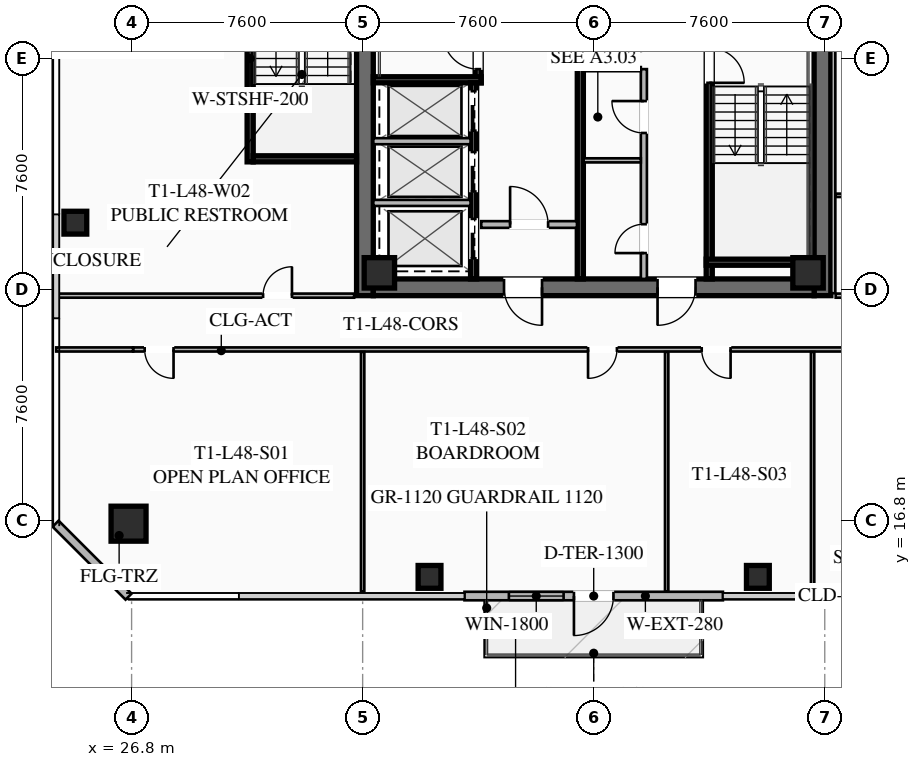
"""IFC4 building model, lengths in metres.
Left out: names, types, materials, properties, quantities, classifications, styles, units other than length and angle.
Written with IfcOpenShell. Run it as: python <this file> out.ifc"""

import sys

from ifc_helpers import new_model, si_unit, direction, frame, frame_2d, origin, origin_2d, place, context, subcontext, project, spatial, rectangle, hollow_rectangle, extrude, element, fill, save


model = new_model("IFC4")
c1 = context("Model", 3, precision=1e-05, world=origin(), true_north=direction((0.0, 1.0)))
c2 = subcontext(c1, "Body", "Model", "MODEL_VIEW")
j1 = project(units=[si_unit("LENGTHUNIT", "METRE"), si_unit("PLANEANGLEUNIT", "RADIAN")], contexts=[c1])
p1 = place(None, origin())
s1 = spatial("IfcSite", under=j1, at=p1, CompositionType="ELEMENT")
p2 = place(p1, origin())
s2 = spatial("IfcBuilding", under=s1, at=p2, CompositionType="ELEMENT")
p3 = place(p2, frame((0.0, 0.0, 178.3)))
s3 = spatial("IfcBuildingStorey", under=s2, at=p3, CompositionType="ELEMENT", Elevation=178.3)
for number, where, z_axis, x_axis in (
    (1, (34.475, 24.2, 0.0), (0.0, 0.0, 1.0), (0.0, 1.0, 0.0)),
    (2, (49.525, 39.8, 0.0), (0.0, 0.0, 1.0), (0.0, -1.0, 0.0)),
):
    element("IfcWall", number, at=place(p3, frame(where, z_axis=z_axis, x_axis=x_axis)), inside=s3, PredefinedType="SHEAR", context=c2, shape_type="SweptSolid", body=[
        extrude(rectangle(XDim=15.6, YDim=0.55, at=frame_2d((7.8, 0.0))), origin(), (0.0, 0.0, 1.0), 3.55),
    ])
p4 = place(p3, frame((49.25, 24.475, 0.0), z_axis=(0.0, 0.0, 1.0), x_axis=(-1.0, 0.0, 0.0)))
e3 = element("IfcWall", 3, at=p4, inside=s3, PredefinedType="SHEAR", context=c2, shape_type="SweptSolid", body=[
    extrude(rectangle(XDim=14.5, YDim=0.55, at=frame_2d((7.25, 0.0))), origin(), (0.0, 0.0, 1.0), 3.55),
])
p5 = place(p4, frame((8.95, 0.0, 0.0)))
e4 = element("IfcOpeningElement", 4, at=p5, cuts=e3, PredefinedType="OPENING", context=c2, shape_type="SweptSolid", body=[
    extrude(rectangle(XDim=1.25, YDim=2.25, at=frame_2d((0.625, 1.125))), frame((0.0, 0.285, 0.0), z_axis=(0.0, -1.0, 0.0), x_axis=(1.0, 0.0, 0.0)), (0.0, 0.0, 1.0), 0.57),
])
p6 = place(p4, frame((3.9, 0.0, 0.0)))
e5 = element("IfcOpeningElement", 5, at=p6, cuts=e3, PredefinedType="OPENING", context=c2, shape_type="SweptSolid", body=[
    extrude(rectangle(XDim=1.25, YDim=2.25, at=frame_2d((0.625, 1.125))), frame((0.0, 0.285, 0.0), z_axis=(0.0, -1.0, 0.0), x_axis=(1.0, 0.0, 0.0)), (0.0, 0.0, 1.0), 0.57),
])
for number, where, z_axis, x_axis in (
    (6, (34.95, 24.95, 0.0), (0.0, 0.0, 1.0), (1.0, 0.0, 0.0)),
    (7, (49.05, 24.95, 0.0), (0.0, 0.0, 1.0), (1.0, 0.0, 0.0)),
):
    element("IfcColumn", number, at=place(p3, frame(where, z_axis=z_axis, x_axis=x_axis)), inside=s3, PredefinedType="COLUMN", context=c2, shape_type="SweptSolid", body=[
        extrude(hollow_rectangle(XDim=1.0, YDim=1.0, WallThickness=0.04, at=origin_2d()), origin(), (0.0, 0.0, 1.0), 3.37),
    ])
p7 = place(p3, frame((26.7, 16.7, 0.0), z_axis=(0.0, 0.0, 1.0), x_axis=(1.0, 0.0, 0.0)))
e8 = element("IfcColumn", 8, at=p7, inside=s3, PredefinedType="COLUMN", context=c2, shape_type="SweptSolid", body=[
    extrude(hollow_rectangle(XDim=1.15, YDim=1.15, WallThickness=0.045, at=origin_2d()), origin(), (0.0, 0.0, 1.0), 3.37),
])
for number, where, z_axis, x_axis in (
    (9, (36.6, 14.95, 0.0), (0.0, 0.0, 1.0), (1.0, 0.0, 0.0)),
    (10, (47.4, 14.95, 0.0), (0.0, 0.0, 1.0), (1.0, 0.0, 0.0)),
    (11, (24.95, 26.6, 0.0), (0.0, 0.0, 1.0), (1.0, 0.0, 0.0)),
):
    element("IfcColumn", number, at=place(p3, frame(where, z_axis=z_axis, x_axis=x_axis)), inside=s3, PredefinedType="COLUMN", context=c2, shape_type="SweptSolid", body=[
        extrude(hollow_rectangle(XDim=0.75, YDim=0.75, WallThickness=0.032, at=origin_2d()), origin(), (0.0, 0.0, 1.0), 3.37),
    ])
p8 = place(p3, frame((46.25, 14.32, 0.0), z_axis=(0.0, 0.0, 1.0), x_axis=(-1.0, 0.0, 0.0)))
e12 = element("IfcWall", 12, at=p8, inside=s3, PredefinedType="SOLIDWALL", context=c2, shape_type="SweptSolid", body=[
    extrude(rectangle(XDim=8.5, YDim=0.28, at=frame_2d((4.25, 0.0))), origin(), (0.0, 0.0, 1.0), 3.37),
])
p9 = place(p8, frame((3.6, 0.0, 0.0)))
e13 = element("IfcOpeningElement", 13, at=p9, cuts=e12, PredefinedType="OPENING", context=c2, shape_type="SweptSolid", body=[
    extrude(rectangle(XDim=1.3, YDim=2.15, at=frame_2d((0.65, 1.075))), frame((0.0, 0.15, 0.0), z_axis=(0.0, -1.0, 0.0), x_axis=(1.0, 0.0, 0.0)), (0.0, 0.0, 1.0), 0.3),
])
p10 = place(p8, frame((5.24, 0.0, 0.85)))
e14 = element("IfcOpeningElement", 14, at=p10, cuts=e12, PredefinedType="OPENING", context=c2, shape_type="SweptSolid", body=[
    extrude(rectangle(XDim=1.8, YDim=1.92, at=frame_2d((0.9, 0.96))), frame((0.0, 0.15, 0.0), z_axis=(0.0, -1.0, 0.0), x_axis=(1.0, 0.0, 0.0)), (0.0, 0.0, 1.0), 0.3),
])
p11 = place(p3, frame((26.7, 14.3, 0.0), z_axis=(0.0, 0.0, 1.0), x_axis=(-0.707106781187, 0.707106781187, 0.0)))
e15 = element("IfcWall", 15, at=p11, inside=s3, PredefinedType="SOLIDWALL", context=c2, shape_type="SweptSolid", body=[
    extrude(rectangle(XDim=3.394, YDim=0.28, at=frame_2d((1.697, 0.0))), origin(), (0.0, 0.0, 1.0), 3.37),
])
p12 = place(p3, frame((38.2, 31.2, 0.0), z_axis=(0.0, 0.0, 1.0), x_axis=(0.0, 1.0, 0.0)))
e16 = element("IfcWall", 16, at=p12, inside=s3, PredefinedType="SHEAR", context=c2, shape_type="SweptSolid", body=[
    extrude(rectangle(XDim=8.05, YDim=0.2, at=frame_2d((4.025, 0.0))), origin(), (0.0, 0.0, 1.0), 3.37),
])
p13 = place(p12, frame((0.45, 0.0, 0.0)))
e17 = element("IfcOpeningElement", 17, at=p13, cuts=e16, PredefinedType="OPENING", context=c2, shape_type="SweptSolid", body=[
    extrude(rectangle(XDim=1.15, YDim=2.2, at=frame_2d((0.575, 1.1))), frame((0.0, 0.11, 0.0), z_axis=(0.0, -1.0, 0.0), x_axis=(1.0, 0.0, 0.0)), (0.0, 0.0, 1.0), 0.22),
])
p14 = place(p3, frame((34.75, 31.3, 0.0), z_axis=(0.0, 0.0, 1.0), x_axis=(1.0, 0.0, 0.0)))
e18 = element("IfcWall", 18, at=p14, inside=s3, PredefinedType="SHEAR", context=c2, shape_type="SweptSolid", body=[
    extrude(rectangle(XDim=3.55, YDim=0.2, at=frame_2d((1.775, 0.0))), origin(), (0.0, 0.0, 1.0), 3.37),
])
p15 = place(p3, frame((45.8, 32.8, 0.0), z_axis=(0.0, 0.0, 1.0), x_axis=(0.0, -1.0, 0.0)))
e19 = element("IfcWall", 19, at=p15, inside=s3, PredefinedType="SHEAR", context=c2, shape_type="SweptSolid", body=[
    extrude(rectangle(XDim=8.05, YDim=0.2, at=frame_2d((4.025, 0.0))), origin(), (0.0, 0.0, 1.0), 3.37),
])
p16 = place(p15, frame((0.45, 0.0, 0.0)))
e20 = element("IfcOpeningElement", 20, at=p16, cuts=e19, PredefinedType="OPENING", context=c2, shape_type="SweptSolid", body=[
    extrude(rectangle(XDim=1.15, YDim=2.2, at=frame_2d((0.575, 1.1))), frame((0.0, 0.11, 0.0), z_axis=(0.0, -1.0, 0.0), x_axis=(1.0, 0.0, 0.0)), (0.0, 0.0, 1.0), 0.22),
])
p17 = place(p3, frame((45.7, 25.3, 0.0), z_axis=(0.0, 0.0, 1.0), x_axis=(1.0, 0.0, 0.0)))
e21 = element("IfcWall", 21, at=p17, inside=s3, PredefinedType="SHEAR", context=c2, shape_type="SweptSolid", body=[
    extrude(rectangle(XDim=3.55, YDim=0.2, at=frame_2d((1.775, 0.0))), origin(), (0.0, 0.0, 1.0), 3.37),
])
p18 = place(p3, frame((41.56, 24.75, 0.0), z_axis=(0.0, 0.0, 1.0), x_axis=(0.0, 1.0, 0.0)))
e22 = element("IfcWall", 22, at=p18, inside=s3, PredefinedType="SHEAR", context=c2, shape_type="SweptSolid", body=[
    extrude(rectangle(XDim=14.5, YDim=0.2, at=frame_2d((7.25, 0.0))), origin(), (0.0, 0.0, 1.0), 3.37),
])
p19 = place(p3, frame((38.3, 26.54, 0.0), z_axis=(0.0, 0.0, 1.0), x_axis=(1.0, 0.0, 0.0)))
e23 = element("IfcWall", 23, at=p19, inside=s3, PredefinedType="SOLIDWALL", context=c2, shape_type="SweptSolid", body=[
    extrude(rectangle(XDim=3.15, YDim=0.22, at=frame_2d((1.575, 0.0))), origin(), (0.0, 0.0, 1.0), 2.723),
])
p20 = place(p19, frame((0.95, 0.0, 0.0)))
e24 = element("IfcOpeningElement", 24, at=p20, cuts=e23, PredefinedType="OPENING", context=c2, shape_type="SweptSolid", body=[
    extrude(rectangle(XDim=1.25, YDim=2.25, at=frame_2d((0.625, 1.125))), frame((0.0, 0.12, 0.0), z_axis=(0.0, -1.0, 0.0), x_axis=(1.0, 0.0, 0.0)), (0.0, 0.0, 1.0), 0.24),
])
p21 = place(p3, frame((38.05, 24.75, 0.0), z_axis=(0.0, 0.0, 1.0), x_axis=(0.0, 1.0, 0.0)))
e25 = element("IfcWall", 25, at=p21, inside=s3, PredefinedType="SHEAR", context=c2, shape_type="SweptSolid", body=[
    extrude(rectangle(XDim=6.45, YDim=0.2, at=frame_2d((3.225, 0.0))), origin(), (0.0, 0.0, 1.0), 3.37),
])
p22 = place(p21, frame((4.875, 0.0, 0.0)))
e26 = element("IfcOpeningElement", 26, at=p22, cuts=e25, PredefinedType="OPENING", context=c2, shape_type="SweptSolid", body=[
    extrude(rectangle(XDim=1.3, YDim=2.25, at=frame_2d((0.65, 1.125))), frame((0.0, 0.11, 0.0), z_axis=(0.0, -1.0, 0.0), x_axis=(1.0, 0.0, 0.0)), (0.0, 0.0, 1.0), 0.22),
])
p23 = place(p21, frame((2.875, 0.0, 0.0)))
e27 = element("IfcOpeningElement", 27, at=p23, cuts=e25, PredefinedType="OPENING", context=c2, shape_type="SweptSolid", body=[
    extrude(rectangle(XDim=1.3, YDim=2.25, at=frame_2d((0.65, 1.125))), frame((0.0, 0.11, 0.0), z_axis=(0.0, -1.0, 0.0), x_axis=(1.0, 0.0, 0.0)), (0.0, 0.0, 1.0), 0.22),
])
p24 = place(p21, frame((0.675, 0.0, 0.0)))
e28 = element("IfcOpeningElement", 28, at=p24, cuts=e25, PredefinedType="OPENING", context=c2, shape_type="SweptSolid", body=[
    extrude(rectangle(XDim=1.3, YDim=2.25, at=frame_2d((0.65, 1.125))), frame((0.0, 0.11, 0.0), z_axis=(0.0, -1.0, 0.0), x_axis=(1.0, 0.0, 0.0)), (0.0, 0.0, 1.0), 0.22),
])
for number, where, z_axis, x_axis in (
    (29, (34.75, 27.25, 0.0), (0.0, 0.0, 1.0), (1.0, 0.0, 0.0)),
    (30, (34.75, 29.28, 0.0), (0.0, 0.0, 1.0), (1.0, 0.0, 0.0)),
):
    element("IfcWall", number, at=place(p3, frame(where, z_axis=z_axis, x_axis=x_axis)), inside=s3, PredefinedType="SOLIDWALL", context=c2, shape_type="SweptSolid", body=[
        extrude(rectangle(XDim=3.2, YDim=0.2, at=frame_2d((1.6, 0.0))), origin(), (0.0, 0.0, 1.0), 3.37),
    ])
p25 = place(p3, frame((43.65, 24.75, 0.0), z_axis=(0.0, 0.0, 1.0), x_axis=(0.0, 1.0, 0.0)))
e31 = element("IfcWall", 31, at=p25, inside=s3, PredefinedType="SOLIDWALL", context=c2, shape_type="SweptSolid", body=[
    extrude(rectangle(XDim=6.9, YDim=0.2, at=frame_2d((3.45, 0.0))), origin(), (0.0, 0.0, 1.0), 2.723),
])
p26 = place(p25, frame((0.85, 0.0, 0.0)))
e32 = element("IfcOpeningElement", 32, at=p26, cuts=e31, PredefinedType="OPENING", context=c2, shape_type="SweptSolid", body=[
    extrude(rectangle(XDim=0.95, YDim=2.05, at=frame_2d((0.475, 1.025))), frame((0.0, 0.11, 0.0), z_axis=(0.0, -1.0, 0.0), x_axis=(1.0, 0.0, 0.0)), (0.0, 0.0, 1.0), 0.22),
])
p27 = place(p25, frame((4.8, 0.0, 0.0)))
e33 = element("IfcOpeningElement", 33, at=p27, cuts=e31, PredefinedType="OPENING", context=c2, shape_type="SweptSolid", body=[
    extrude(rectangle(XDim=1.05, YDim=2.2, at=frame_2d((0.525, 1.1))), frame((0.0, 0.11, 0.0), z_axis=(0.0, -1.0, 0.0), x_axis=(1.0, 0.0, 0.0)), (0.0, 0.0, 1.0), 0.22),
])
for number, where, z_axis, x_axis in (
    (34, (41.67, 31.65, 0.0), (0.0, 0.0, 1.0), (1.0, 0.0, 0.0)),
    (35, (41.67, 28.65, 0.0), (0.0, 0.0, 1.0), (1.0, 0.0, 0.0)),
):
    element("IfcWall", number, at=place(p3, frame(where, z_axis=z_axis, x_axis=x_axis)), inside=s3, PredefinedType="PARTITIONING", context=c2, shape_type="SweptSolid", body=[
        extrude(rectangle(XDim=1.88, YDim=0.135, at=frame_2d((0.94, 0.0))), origin(), (0.0, 0.0, 1.0), 2.723),
    ])
p28 = place(p3, frame((30.7, 28.6, 0.0), z_axis=(0.0, 0.0, 1.0), x_axis=(0.0, 1.0, 0.0)))
e36 = element("IfcWall", 36, at=p28, inside=s3, PredefinedType="SHEAR", context=c2, shape_type="SweptSolid", body=[
    extrude(rectangle(XDim=6.8, YDim=0.2, at=frame_2d((3.4, 0.0))), origin(), (0.0, 0.0, 1.0), 3.37),
])
p29 = place(p3, frame((30.8, 28.7, 0.0), z_axis=(0.0, 0.0, 1.0), x_axis=(1.0, 0.0, 0.0)))
e37 = element("IfcWall", 37, at=p29, inside=s3, PredefinedType="SHEAR", context=c2, shape_type="SweptSolid", body=[
    extrude(rectangle(XDim=3.4, YDim=0.2, at=frame_2d((1.7, 0.0))), origin(), (0.0, 0.0, 1.0), 3.37),
])
p30 = place(p3, frame((57.15, 22.43, 0.0), z_axis=(0.0, 0.0, 1.0), x_axis=(-1.0, 0.0, 0.0)))
e38 = element("IfcWall", 38, at=p30, inside=s3, PredefinedType="PARTITIONING", context=c2, shape_type="SweptSolid", body=[
    extrude(rectangle(XDim=30.3, YDim=0.135, at=frame_2d((15.15, 0.0))), origin(), (0.0, 0.0, 1.0), 2.723),
])
p31 = place(p30, frame((28.97, 0.0, 0.0)))
e39 = element("IfcOpeningElement", 39, at=p31, cuts=e38, PredefinedType="OPENING", context=c2, shape_type="SweptSolid", body=[
    extrude(rectangle(XDim=0.95, YDim=2.05, at=frame_2d((0.475, 1.025))), frame((0.0, 0.077, 0.0), z_axis=(0.0, -1.0, 0.0), x_axis=(1.0, 0.0, 0.0)), (0.0, 0.0, 1.0), 0.155),
])
p32 = place(p30, frame((14.386, 0.0, 0.0)))
e40 = element("IfcOpeningElement", 40, at=p32, cuts=e38, PredefinedType="OPENING", context=c2, shape_type="SweptSolid", body=[
    extrude(rectangle(XDim=0.95, YDim=2.05, at=frame_2d((0.475, 1.025))), frame((0.0, 0.077, 0.0), z_axis=(0.0, -1.0, 0.0), x_axis=(1.0, 0.0, 0.0)), (0.0, 0.0, 1.0), 0.155),
])
p33 = place(p30, frame((10.647, 0.0, 0.0)))
e41 = element("IfcOpeningElement", 41, at=p33, cuts=e38, PredefinedType="OPENING", context=c2, shape_type="SweptSolid", body=[
    extrude(rectangle(XDim=0.95, YDim=2.05, at=frame_2d((0.475, 1.025))), frame((0.0, 0.077, 0.0), z_axis=(0.0, -1.0, 0.0), x_axis=(1.0, 0.0, 0.0)), (0.0, 0.0, 1.0), 0.155),
])
p34 = place(p30, frame((0.38, 0.0, 0.0)))
e42 = element("IfcOpeningElement", 42, at=p34, cuts=e38, PredefinedType="OPENING", context=c2, shape_type="SweptSolid", body=[
    extrude(rectangle(XDim=0.95, YDim=2.05, at=frame_2d((0.475, 1.025))), frame((0.0, 0.077, 0.0), z_axis=(0.0, -1.0, 0.0), x_axis=(1.0, 0.0, 0.0)), (0.0, 0.0, 1.0), 0.155),
])
p35 = place(p3, frame((24.32, 22.43, 0.0), z_axis=(0.0, 0.0, 1.0), x_axis=(1.0, 0.0, 0.0)))
e43 = element("IfcWall", 43, at=p35, inside=s3, PredefinedType="PARTITIONING", context=c2, shape_type="SweptSolid", body=[
    extrude(rectangle(XDim=2.53, YDim=0.135, at=frame_2d((1.265, 0.0))), origin(), (0.0, 0.0, 1.0), 2.723),
])
for number, where, z_axis, x_axis in (
    (44, (34.4, 14.47, 0.0), (0.0, 0.0, 1.0), (0.0, 1.0, 0.0)),
    (45, (44.4, 14.47, 0.0), (0.0, 0.0, 1.0), (0.0, 1.0, 0.0)),
    (46, (49.2, 14.47, 0.0), (0.0, 0.0, 1.0), (0.0, 1.0, 0.0)),
):
    element("IfcWall", number, at=place(p3, frame(where, z_axis=z_axis, x_axis=x_axis)), inside=s3, PredefinedType="PARTITIONING", context=c2, shape_type="SweptSolid", body=[
        extrude(rectangle(XDim=7.88, YDim=0.11, at=frame_2d((3.94, 0.0))), origin(), (0.0, 0.0, 1.0), 2.723),
    ])
p36 = place(p3, frame((49.88, 39.72, 0.0), z_axis=(0.0, 0.0, 1.0), x_axis=(0.0, -1.0, 0.0)))
e47 = element("IfcWall", 47, at=p36, inside=s3, PredefinedType="PARTITIONING", context=c2, shape_type="SweptSolid", body=[
    extrude(rectangle(XDim=15.44, YDim=0.135, at=frame_2d((7.72, 0.0))), origin(), (0.0, 0.0, 1.0), 2.723),
])
p37 = place(p3, frame((49.96, 24.2, 0.0), z_axis=(0.0, 0.0, 1.0), x_axis=(1.0, 0.0, 0.0)))
e48 = element("IfcWall", 48, at=p37, inside=s3, PredefinedType="PARTITIONING", context=c2, shape_type="SweptSolid", body=[
    extrude(rectangle(XDim=9.72, YDim=0.135, at=frame_2d((4.86, 0.0))), origin(), (0.0, 0.0, 1.0), 2.723),
])
p38 = place(p37, frame((0.5, 0.0, 0.0)))
e49 = element("IfcOpeningElement", 49, at=p38, cuts=e48, PredefinedType="OPENING", context=c2, shape_type="SweptSolid", body=[
    extrude(rectangle(XDim=0.95, YDim=2.05, at=frame_2d((0.475, 1.025))), frame((0.0, 0.077, 0.0), z_axis=(0.0, -1.0, 0.0), x_axis=(1.0, 0.0, 0.0)), (0.0, 0.0, 1.0), 0.155),
])
p39 = place(p3, frame((49.96, 27.5, 0.0), z_axis=(0.0, 0.0, 1.0), x_axis=(1.0, 0.0, 0.0)))
e50 = element("IfcWall", 50, at=p39, inside=s3, PredefinedType="PARTITIONING", context=c2, shape_type="SweptSolid", body=[
    extrude(rectangle(XDim=9.72, YDim=0.11, at=frame_2d((4.86, 0.0))), origin(), (0.0, 0.0, 1.0), 2.723),
])
p40 = place(p3, frame((24.32, 24.2, 0.0), z_axis=(0.0, 0.0, 1.0), x_axis=(1.0, 0.0, 0.0)))
e51 = element("IfcWall", 51, at=p40, inside=s3, PredefinedType="PARTITIONING", context=c2, shape_type="SweptSolid", body=[
    extrude(rectangle(XDim=9.8, YDim=0.135, at=frame_2d((4.9, 0.0))), origin(), (0.0, 0.0, 1.0), 2.723),
])
p41 = place(p40, frame((6.805, 0.0, 0.0)))
e52 = element("IfcOpeningElement", 52, at=p41, cuts=e51, PredefinedType="OPENING", context=c2, shape_type="SweptSolid", body=[
    extrude(rectangle(XDim=0.95, YDim=2.05, at=frame_2d((0.475, 1.025))), frame((0.0, 0.077, 0.0), z_axis=(0.0, -1.0, 0.0), x_axis=(1.0, 0.0, 0.0)), (0.0, 0.0, 1.0), 0.155),
])
p42 = place(p9, origin())
e53 = element("IfcDoor", 53, at=p42, inside=s3, OperationType="SINGLE_SWING_RIGHT", PredefinedType="DOOR", context=c2, shape_type="SweptSolid", body=[
    extrude(rectangle(XDim=1.3, YDim=2.15, at=frame_2d((0.65, 1.075))), frame((0.0, 0.025, 0.0), z_axis=(0.0, -1.0, 0.0), x_axis=(1.0, 0.0, 0.0)), (0.0, 0.0, 1.0), 0.05),
])
fill(e13, e53)
p43 = place(p10, origin())
e54 = element("IfcWindow", 54, at=p43, inside=s3, PartitioningType="SINGLE_PANEL", PredefinedType="WINDOW", context=c2, shape_type="SweptSolid", body=[
    extrude(rectangle(XDim=1.8, YDim=1.92, at=frame_2d((0.9, 0.96))), frame((0.0, 0.03, 0.0), z_axis=(0.0, -1.0, 0.0), x_axis=(1.0, 0.0, 0.0)), (0.0, 0.0, 1.0), 0.06),
])
fill(e14, e54)
p44 = place(p5, origin())
e55 = element("IfcDoor", 55, at=p44, inside=s3, OperationType="SINGLE_SWING_LEFT", PredefinedType="DOOR", context=c2, shape_type="SweptSolid", body=[
    extrude(rectangle(XDim=1.25, YDim=2.25, at=frame_2d((0.625, 1.125))), frame((0.0, 0.025, 0.0), z_axis=(0.0, -1.0, 0.0), x_axis=(1.0, 0.0, 0.0)), (0.0, 0.0, 1.0), 0.05),
])
fill(e4, e55)
p45 = place(p6, origin())
e56 = element("IfcDoor", 56, at=p45, inside=s3, OperationType="SINGLE_SWING_RIGHT", PredefinedType="DOOR", context=c2, shape_type="SweptSolid", body=[
    extrude(rectangle(XDim=1.25, YDim=2.25, at=frame_2d((0.625, 1.125))), frame((0.0, 0.025, 0.0), z_axis=(0.0, -1.0, 0.0), x_axis=(1.0, 0.0, 0.0)), (0.0, 0.0, 1.0), 0.05),
])
fill(e5, e56)
p46 = place(p13, origin())
e57 = element("IfcDoor", 57, at=p46, inside=s3, OperationType="SINGLE_SWING_RIGHT", PredefinedType="DOOR", context=c2, shape_type="SweptSolid", body=[
    extrude(rectangle(XDim=1.15, YDim=2.2, at=frame_2d((0.575, 1.1))), frame((0.0, 0.025, 0.0), z_axis=(0.0, -1.0, 0.0), x_axis=(1.0, 0.0, 0.0)), (0.0, 0.0, 1.0), 0.05),
])
fill(e17, e57)
p47 = place(p16, origin())
e58 = element("IfcDoor", 58, at=p47, inside=s3, OperationType="SINGLE_SWING_RIGHT", PredefinedType="DOOR", context=c2, shape_type="SweptSolid", body=[
    extrude(rectangle(XDim=1.15, YDim=2.2, at=frame_2d((0.575, 1.1))), frame((0.0, 0.025, 0.0), z_axis=(0.0, -1.0, 0.0), x_axis=(1.0, 0.0, 0.0)), (0.0, 0.0, 1.0), 0.05),
])
fill(e20, e58)
p48 = place(p20, origin())
e59 = element("IfcDoor", 59, at=p48, inside=s3, OperationType="SINGLE_SWING_LEFT", PredefinedType="DOOR", context=c2, shape_type="SweptSolid", body=[
    extrude(rectangle(XDim=1.25, YDim=2.25, at=frame_2d((0.625, 1.125))), frame((0.0, 0.025, 0.0), z_axis=(0.0, -1.0, 0.0), x_axis=(1.0, 0.0, 0.0)), (0.0, 0.0, 1.0), 0.05),
])
fill(e24, e59)
p49 = place(p26, origin())
e60 = element("IfcDoor", 60, at=p49, inside=s3, OperationType="SINGLE_SWING_LEFT", PredefinedType="DOOR", context=c2, shape_type="SweptSolid", body=[
    extrude(rectangle(XDim=0.95, YDim=2.05, at=frame_2d((0.475, 1.025))), frame((0.0, 0.025, 0.0), z_axis=(0.0, -1.0, 0.0), x_axis=(1.0, 0.0, 0.0)), (0.0, 0.0, 1.0), 0.05),
])
fill(e32, e60)
p50 = place(p27, origin())
e61 = element("IfcDoor", 61, at=p50, inside=s3, OperationType="SINGLE_SWING_RIGHT", PredefinedType="DOOR", context=c2, shape_type="SweptSolid", body=[
    extrude(rectangle(XDim=1.05, YDim=2.2, at=frame_2d((0.525, 1.1))), frame((0.0, 0.025, 0.0), z_axis=(0.0, -1.0, 0.0), x_axis=(1.0, 0.0, 0.0)), (0.0, 0.0, 1.0), 0.05),
])
fill(e33, e61)
p51 = place(p31, origin())
e62 = element("IfcDoor", 62, at=p51, inside=s3, OperationType="SINGLE_SWING_LEFT", PredefinedType="DOOR", context=c2, shape_type="SweptSolid", body=[
    extrude(rectangle(XDim=0.95, YDim=2.05, at=frame_2d((0.475, 1.025))), frame((0.0, 0.025, 0.0), z_axis=(0.0, -1.0, 0.0), x_axis=(1.0, 0.0, 0.0)), (0.0, 0.0, 1.0), 0.05),
])
fill(e39, e62)
p52 = place(p32, origin())
e63 = element("IfcDoor", 63, at=p52, inside=s3, OperationType="SINGLE_SWING_RIGHT", PredefinedType="DOOR", context=c2, shape_type="SweptSolid", body=[
    extrude(rectangle(XDim=0.95, YDim=2.05, at=frame_2d((0.475, 1.025))), frame((0.0, 0.025, 0.0), z_axis=(0.0, -1.0, 0.0), x_axis=(1.0, 0.0, 0.0)), (0.0, 0.0, 1.0), 0.05),
])
fill(e40, e63)
p53 = place(p33, origin())
e64 = element("IfcDoor", 64, at=p53, inside=s3, OperationType="SINGLE_SWING_LEFT", PredefinedType="DOOR", context=c2, shape_type="SweptSolid", body=[
    extrude(rectangle(XDim=0.95, YDim=2.05, at=frame_2d((0.475, 1.025))), frame((0.0, 0.025, 0.0), z_axis=(0.0, -1.0, 0.0), x_axis=(1.0, 0.0, 0.0)), (0.0, 0.0, 1.0), 0.05),
])
fill(e41, e64)
p54 = place(p41, origin())
e65 = element("IfcDoor", 65, at=p54, inside=s3, OperationType="SINGLE_SWING_RIGHT", PredefinedType="DOOR", context=c2, shape_type="SweptSolid", body=[
    extrude(rectangle(XDim=0.95, YDim=2.05, at=frame_2d((0.475, 1.025))), frame((0.0, 0.025, 0.0), z_axis=(0.0, -1.0, 0.0), x_axis=(1.0, 0.0, 0.0)), (0.0, 0.0, 1.0), 0.05),
])
fill(e52, e65)
p55 = place(p22, origin())
e66 = element("IfcDoor", 66, at=p55, inside=s3, OperationType="SLIDING_TO_LEFT", PredefinedType="DOOR", context=c2, shape_type="SweptSolid", body=[
    extrude(rectangle(XDim=1.3, YDim=2.25, at=frame_2d((0.65, 1.125))), frame((0.0, 0.025, 0.0), z_axis=(0.0, -1.0, 0.0), x_axis=(1.0, 0.0, 0.0)), (0.0, 0.0, 1.0), 0.05),
])
fill(e26, e66)
p56 = place(p23, origin())
e67 = element("IfcDoor", 67, at=p56, inside=s3, OperationType="SLIDING_TO_LEFT", PredefinedType="DOOR", context=c2, shape_type="SweptSolid", body=[
    extrude(rectangle(XDim=1.3, YDim=2.25, at=frame_2d((0.65, 1.125))), frame((0.0, 0.025, 0.0), z_axis=(0.0, -1.0, 0.0), x_axis=(1.0, 0.0, 0.0)), (0.0, 0.0, 1.0), 0.05),
])
fill(e27, e67)
p57 = place(p24, origin())
e68 = element("IfcDoor", 68, at=p57, inside=s3, OperationType="SLIDING_TO_LEFT", PredefinedType="DOOR", context=c2, shape_type="SweptSolid", body=[
    extrude(rectangle(XDim=1.3, YDim=2.25, at=frame_2d((0.65, 1.125))), frame((0.0, 0.025, 0.0), z_axis=(0.0, -1.0, 0.0), x_axis=(1.0, 0.0, 0.0)), (0.0, 0.0, 1.0), 0.05),
])
fill(e28, e68)
save(model, sys.argv[1])
